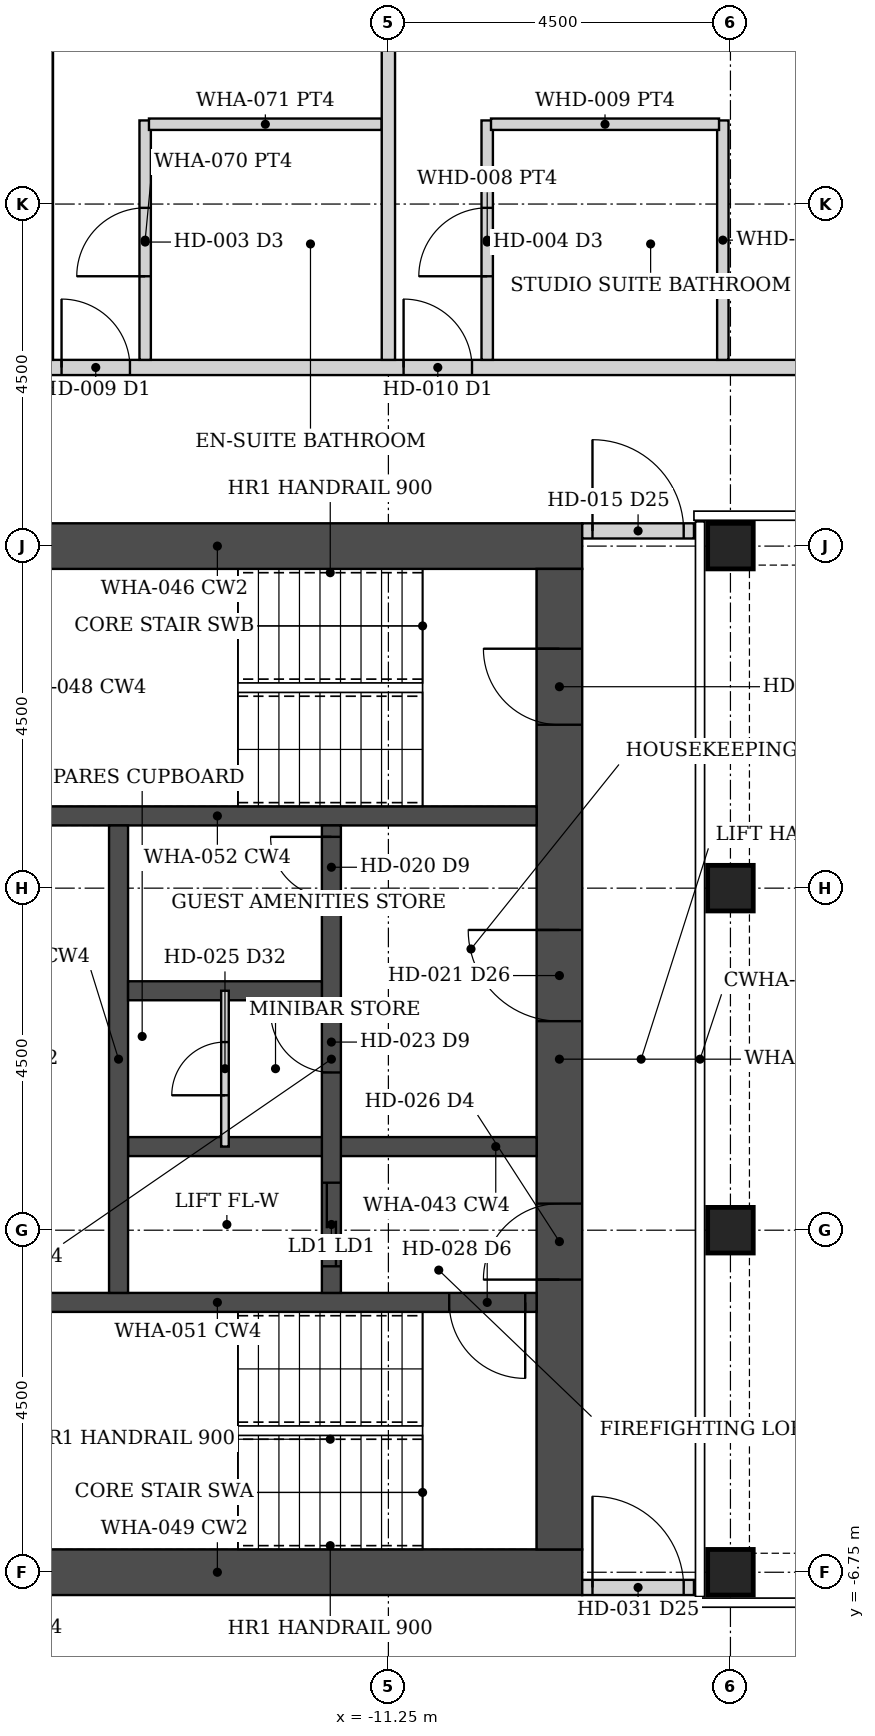
"""IFC4 building model, lengths in metres.
Left out: names, types, materials, properties, quantities, classifications, styles, units other than length and angle.
Written with IfcOpenShell. Run it as: python <this file> out.ifc"""

import sys

from ifc_helpers import new_model, si_unit, direction, frame, frame_2d, origin, origin_2d, place, context, subcontext, project, spatial, rectangle, hollow_rectangle, extrude, element, fill, save


model = new_model("IFC4")
c1 = context("Model", 3, precision=1e-05, world=origin(), true_north=direction((0.0, 1.0)))
c2 = subcontext(c1, "Body", "Model", "MODEL_VIEW")
j1 = project(units=[si_unit("LENGTHUNIT", "METRE"), si_unit("PLANEANGLEUNIT", "RADIAN")], contexts=[c1])
p1 = place(None, origin())
s1 = spatial("IfcSite", under=j1, at=p1, CompositionType="ELEMENT")
p2 = place(p1, origin())
s2 = spatial("IfcBuilding", under=s1, at=p2, CompositionType="ELEMENT")
p3 = place(p2, frame((0.0, 0.0, 150.8)))
s3 = spatial("IfcBuildingStorey", under=s2, at=p3, CompositionType="ELEMENT", Elevation=150.8)
for number, where, z_axis, x_axis in (
    (1, (-6.75, -6.75, 0.0), (0.0, 0.0, 1.0), (1.0, 0.0, 0.0)),
    (2, (-6.75, -2.25, 0.0), (0.0, 0.0, 1.0), (1.0, 0.0, 0.0)),
    (3, (-6.75, 2.25, 0.0), (0.0, 0.0, 1.0), (1.0, 0.0, 0.0)),
    (4, (-6.75, 6.75, 0.0), (0.0, 0.0, 1.0), (1.0, 0.0, 0.0)),
):
    element("IfcColumn", number, at=place(p3, frame(where, z_axis=z_axis, x_axis=x_axis)), inside=s3, PredefinedType="COLUMN", context=c2, shape_type="SweptSolid", body=[
        extrude(hollow_rectangle(XDim=0.6, YDim=0.6, WallThickness=0.04, at=origin_2d()), origin(), (0.0, 0.0, 1.0), 3.6),
    ])
for number, where, z_axis, x_axis in (
    (5, (-8.7, -6.75, 0.0), (0.0, 0.0, 1.0), (-1.0, 0.0, 0.0)),
    (6, (-8.7, 6.75, 0.0), (0.0, 0.0, 1.0), (-1.0, 0.0, 0.0)),
):
    element("IfcWall", number, at=place(p3, frame(where, z_axis=z_axis, x_axis=x_axis)), inside=s3, PredefinedType="SHEAR", context=c2, shape_type="SweptSolid", body=[
        extrude(rectangle(XDim=9.6, YDim=0.6, at=frame_2d((4.8, 0.0))), origin(), (0.0, 0.0, 1.0), 3.6),
    ])
p4 = place(p3, frame((-9.0, -6.45, 0.0), z_axis=(0.0, 0.0, 1.0), x_axis=(0.0, 1.0, 0.0)))
e7 = element("IfcWall", 7, at=p4, inside=s3, PredefinedType="SHEAR", context=c2, shape_type="SweptSolid", body=[
    extrude(rectangle(XDim=12.9, YDim=0.6, at=frame_2d((6.45, 0.0))), origin(), (0.0, 0.0, 1.0), 3.6),
])
p5 = place(p4, frame((3.55, 0.0, 0.0)))
e8 = element("IfcOpeningElement", 8, at=p5, cuts=e7, PredefinedType="OPENING", context=c2, shape_type="SweptSolid", body=[
    extrude(rectangle(XDim=1.0, YDim=2.1, at=frame_2d((0.5, 1.05))), frame((0.0, 0.31, 0.0), z_axis=(0.0, -1.0, 0.0), x_axis=(1.0, 0.0, 0.0)), (0.0, 0.0, 1.0), 0.62),
])
p6 = place(p4, frame((6.95, 0.0, 0.0)))
e9 = element("IfcOpeningElement", 9, at=p6, cuts=e7, PredefinedType="OPENING", context=c2, shape_type="SweptSolid", body=[
    extrude(rectangle(XDim=1.2, YDim=2.1, at=frame_2d((0.6, 1.05))), frame((0.0, 0.31, 0.0), z_axis=(0.0, -1.0, 0.0), x_axis=(1.0, 0.0, 0.0)), (0.0, 0.0, 1.0), 0.62),
])
p7 = place(p4, frame((10.85, 0.0, 0.0)))
e10 = element("IfcOpeningElement", 10, at=p7, cuts=e7, PredefinedType="OPENING", context=c2, shape_type="SweptSolid", body=[
    extrude(rectangle(XDim=1.0, YDim=2.1, at=frame_2d((0.5, 1.05))), frame((0.0, 0.31, 0.0), z_axis=(0.0, -1.0, 0.0), x_axis=(1.0, 0.0, 0.0)), (0.0, 0.0, 1.0), 0.62),
])
p8 = place(p3, frame((-9.3, -3.2, 0.0), z_axis=(0.0, 0.0, 1.0), x_axis=(-1.0, 0.0, 0.0)))
e11 = element("IfcWall", 11, at=p8, inside=s3, PredefinedType="SHEAR", context=c2, shape_type="SweptSolid", body=[
    extrude(rectangle(XDim=8.4, YDim=0.25, at=frame_2d((4.2, 0.0))), origin(), (0.0, 0.0, 1.0), 3.6),
])
p9 = place(p8, frame((0.15, 0.0, 0.0)))
e12 = element("IfcOpeningElement", 12, at=p9, cuts=e11, PredefinedType="OPENING", context=c2, shape_type="SweptSolid", body=[
    extrude(rectangle(XDim=1.0, YDim=2.1, at=frame_2d((0.5, 1.05))), frame((0.0, 0.135, 0.0), z_axis=(0.0, -1.0, 0.0), x_axis=(1.0, 0.0, 0.0)), (0.0, 0.0, 1.0), 0.27),
])
p10 = place(p3, frame((-9.3, 3.2, 0.0), z_axis=(0.0, 0.0, 1.0), x_axis=(-1.0, 0.0, 0.0)))
e13 = element("IfcWall", 13, at=p10, inside=s3, PredefinedType="SHEAR", context=c2, shape_type="SweptSolid", body=[
    extrude(rectangle(XDim=8.4, YDim=0.25, at=frame_2d((4.2, 0.0))), origin(), (0.0, 0.0, 1.0), 3.6),
])
p11 = place(p3, frame((-9.3, -1.15, 0.0), z_axis=(0.0, 0.0, 1.0), x_axis=(-1.0, 0.0, 0.0)))
e14 = element("IfcWall", 14, at=p11, inside=s3, PredefinedType="SHEAR", context=c2, shape_type="SweptSolid", body=[
    extrude(rectangle(XDim=5.375, YDim=0.25, at=frame_2d((2.688, 0.0))), origin(), (0.0, 0.0, 1.0), 3.6),
])
p12 = place(p3, frame((-12.0, -3.075, 0.0), z_axis=(0.0, 0.0, 1.0), x_axis=(0.0, 1.0, 0.0)))
e15 = element("IfcWall", 15, at=p12, inside=s3, PredefinedType="SHEAR", context=c2, shape_type="SweptSolid", body=[
    extrude(rectangle(XDim=6.15, YDim=0.25, at=frame_2d((3.075, 0.0))), origin(), (0.0, 0.0, 1.0), 3.6),
])
p13 = place(p12, frame((2.9, 0.0, 0.0)))
e16 = element("IfcOpeningElement", 16, at=p13, cuts=e15, PredefinedType="OPENING", context=c2, shape_type="SweptSolid", body=[
    extrude(rectangle(XDim=0.8, YDim=2.1, at=frame_2d((0.4, 1.05))), frame((0.0, 0.135, 0.0), z_axis=(0.0, -1.0, 0.0), x_axis=(1.0, 0.0, 0.0)), (0.0, 0.0, 1.0), 0.27),
])
p14 = place(p12, frame((5.2, 0.0, 0.0)))
e17 = element("IfcOpeningElement", 17, at=p14, cuts=e15, PredefinedType="OPENING", context=c2, shape_type="SweptSolid", body=[
    extrude(rectangle(XDim=0.8, YDim=2.1, at=frame_2d((0.4, 1.05))), frame((0.0, 0.135, 0.0), z_axis=(0.0, -1.0, 0.0), x_axis=(1.0, 0.0, 0.0)), (0.0, 0.0, 1.0), 0.27),
])
p15 = place(p12, frame((0.35, 0.0, 0.0)))
e18 = element("IfcOpeningElement", 18, at=p15, cuts=e15, PredefinedType="OPENING", context=c2, shape_type="SweptSolid", body=[
    extrude(rectangle(XDim=1.1, YDim=2.1, at=frame_2d((0.55, 1.05))), frame((0.0, 0.135, 0.0), z_axis=(0.0, -1.0, 0.0), x_axis=(1.0, 0.0, 0.0)), (0.0, 0.0, 1.0), 0.27),
])
p16 = place(p3, frame((-14.8, -3.075, 0.0), z_axis=(0.0, 0.0, 1.0), x_axis=(0.0, 1.0, 0.0)))
e19 = element("IfcWall", 19, at=p16, inside=s3, PredefinedType="SHEAR", context=c2, shape_type="SweptSolid", body=[
    extrude(rectangle(XDim=6.15, YDim=0.25, at=frame_2d((3.075, 0.0))), origin(), (0.0, 0.0, 1.0), 3.6),
])
p17 = place(p3, frame((-12.125, 0.9, 0.0), z_axis=(0.0, 0.0, 1.0), x_axis=(-1.0, 0.0, 0.0)))
e20 = element("IfcWall", 20, at=p17, inside=s3, PredefinedType="SHEAR", context=c2, shape_type="SweptSolid", body=[
    extrude(rectangle(XDim=2.55, YDim=0.25, at=frame_2d((1.275, 0.0))), origin(), (0.0, 0.0, 1.0), 3.6),
])
p18 = place(p3, frame((-8.7, 6.95, 0.0), z_axis=(0.0, 0.0, 1.0), x_axis=(1.0, 0.0, 0.0)))
e21 = element("IfcWall", 21, at=p18, inside=s3, PredefinedType="PARTITIONING", context=c2, shape_type="SweptSolid", body=[
    extrude(rectangle(XDim=1.47, YDim=0.2, at=frame_2d((0.735, 0.0))), origin(), (0.0, 0.0, 1.0), 2.473),
])
p19 = place(p18, frame((0.135, 0.0, 0.0)))
e22 = element("IfcOpeningElement", 22, at=p19, cuts=e21, PredefinedType="OPENING", context=c2, shape_type="SweptSolid", body=[
    extrude(rectangle(XDim=1.2, YDim=2.1, at=frame_2d((0.6, 1.05))), frame((0.0, 0.11, 0.0), z_axis=(0.0, -1.0, 0.0), x_axis=(1.0, 0.0, 0.0)), (0.0, 0.0, 1.0), 0.22),
])
p20 = place(p3, frame((-8.7, -6.95, 0.0), z_axis=(0.0, 0.0, 1.0), x_axis=(1.0, 0.0, 0.0)))
e23 = element("IfcWall", 23, at=p20, inside=s3, PredefinedType="PARTITIONING", context=c2, shape_type="SweptSolid", body=[
    extrude(rectangle(XDim=1.47, YDim=0.2, at=frame_2d((0.735, 0.0))), origin(), (0.0, 0.0, 1.0), 2.473),
])
p21 = place(p20, frame((0.135, 0.0, 0.0)))
e24 = element("IfcOpeningElement", 24, at=p21, cuts=e23, PredefinedType="OPENING", context=c2, shape_type="SweptSolid", body=[
    extrude(rectangle(XDim=1.2, YDim=2.1, at=frame_2d((0.6, 1.05))), frame((0.0, 0.11, 0.0), z_axis=(0.0, -1.0, 0.0), x_axis=(1.0, 0.0, 0.0)), (0.0, 0.0, 1.0), 0.22),
])
p22 = place(p3, frame((-22.3, 9.1, 0.0), z_axis=(0.0, 0.0, 1.0), x_axis=(1.0, 0.0, 0.0)))
e25 = element("IfcWall", 25, at=p22, inside=s3, PredefinedType="PARTITIONING", context=c2, shape_type="SweptSolid", body=[
    extrude(rectangle(XDim=44.6, YDim=0.2, at=frame_2d((22.3, 0.0))), origin(), (0.0, 0.0, 1.0), 2.473),
])
p23 = place(p22, frame((6.75, 0.0, 0.0)))
e26 = element("IfcOpeningElement", 26, at=p23, cuts=e25, PredefinedType="OPENING", context=c2, shape_type="SweptSolid", body=[
    extrude(rectangle(XDim=0.9, YDim=2.1, at=frame_2d((0.45, 1.05))), frame((0.0, 0.11, 0.0), z_axis=(0.0, -1.0, 0.0), x_axis=(1.0, 0.0, 0.0)), (0.0, 0.0, 1.0), 0.22),
])
p24 = place(p22, frame((11.25, 0.0, 0.0)))
e27 = element("IfcOpeningElement", 27, at=p24, cuts=e25, PredefinedType="OPENING", context=c2, shape_type="SweptSolid", body=[
    extrude(rectangle(XDim=0.9, YDim=2.1, at=frame_2d((0.45, 1.05))), frame((0.0, 0.11, 0.0), z_axis=(0.0, -1.0, 0.0), x_axis=(1.0, 0.0, 0.0)), (0.0, 0.0, 1.0), 0.22),
])
p25 = place(p22, frame((23.45, 0.0, 0.0)))
e28 = element("IfcOpeningElement", 28, at=p25, cuts=e25, PredefinedType="OPENING", context=c2, shape_type="SweptSolid", body=[
    extrude(rectangle(XDim=0.9, YDim=2.1, at=frame_2d((0.45, 1.05))), frame((0.0, 0.11, 0.0), z_axis=(0.0, -1.0, 0.0), x_axis=(1.0, 0.0, 0.0)), (0.0, 0.0, 1.0), 0.22),
])
p26 = place(p22, frame((32.45, 0.0, 0.0)))
e29 = element("IfcOpeningElement", 29, at=p26, cuts=e25, PredefinedType="OPENING", context=c2, shape_type="SweptSolid", body=[
    extrude(rectangle(XDim=0.9, YDim=2.1, at=frame_2d((0.45, 1.05))), frame((0.0, 0.11, 0.0), z_axis=(0.0, -1.0, 0.0), x_axis=(1.0, 0.0, 0.0)), (0.0, 0.0, 1.0), 0.22),
])
p27 = place(p22, frame((33.75, 0.0, 0.0)))
e30 = element("IfcOpeningElement", 30, at=p27, cuts=e25, PredefinedType="OPENING", context=c2, shape_type="SweptSolid", body=[
    extrude(rectangle(XDim=0.9, YDim=2.1, at=frame_2d((0.45, 1.05))), frame((0.0, 0.11, 0.0), z_axis=(0.0, -1.0, 0.0), x_axis=(1.0, 0.0, 0.0)), (0.0, 0.0, 1.0), 0.22),
])
p28 = place(p22, frame((38.85, 0.0, 0.0)))
e31 = element("IfcOpeningElement", 31, at=p28, cuts=e25, PredefinedType="OPENING", context=c2, shape_type="SweptSolid", body=[
    extrude(rectangle(XDim=0.9, YDim=2.1, at=frame_2d((0.45, 1.05))), frame((0.0, 0.11, 0.0), z_axis=(0.0, -1.0, 0.0), x_axis=(1.0, 0.0, 0.0)), (0.0, 0.0, 1.0), 0.22),
])
p29 = place(p22, frame((4.85, 0.0, 0.0)))
e32 = element("IfcOpeningElement", 32, at=p29, cuts=e25, PredefinedType="OPENING", context=c2, shape_type="SweptSolid", body=[
    extrude(rectangle(XDim=0.9, YDim=2.1, at=frame_2d((0.45, 1.05))), frame((0.0, 0.11, 0.0), z_axis=(0.0, -1.0, 0.0), x_axis=(1.0, 0.0, 0.0)), (0.0, 0.0, 1.0), 0.22),
])
p30 = place(p3, frame((-14.45, 9.2, 0.0), z_axis=(0.0, 0.0, 1.0), x_axis=(0.0, 1.0, 0.0)))
e33 = element("IfcWall", 33, at=p30, inside=s3, PredefinedType="PARTITIONING", context=c2, shape_type="SweptSolid", body=[
    extrude(rectangle(XDim=3.15, YDim=0.15, at=frame_2d((1.575, 0.0))), origin(), (0.0, 0.0, 1.0), 2.473),
])
p31 = place(p30, frame((1.1, 0.0, 0.0)))
e34 = element("IfcOpeningElement", 34, at=p31, cuts=e33, PredefinedType="OPENING", context=c2, shape_type="SweptSolid", body=[
    extrude(rectangle(XDim=0.9, YDim=2.1, at=frame_2d((0.45, 1.05))), frame((0.0, 0.085, 0.0), z_axis=(0.0, -1.0, 0.0), x_axis=(1.0, 0.0, 0.0)), (0.0, 0.0, 1.0), 0.17),
])
p32 = place(p3, frame((-14.4, 12.3, 0.0), z_axis=(0.0, 0.0, 1.0), x_axis=(1.0, 0.0, 0.0)))
e35 = element("IfcWall", 35, at=p32, inside=s3, PredefinedType="PARTITIONING", context=c2, shape_type="SweptSolid", body=[
    extrude(rectangle(XDim=3.062, YDim=0.15, at=frame_2d((1.531, 0.0))), origin(), (0.0, 0.0, 1.0), 2.473),
])
p33 = place(p3, frame((-9.95, 9.2, 0.0), z_axis=(0.0, 0.0, 1.0), x_axis=(0.0, 1.0, 0.0)))
e36 = element("IfcWall", 36, at=p33, inside=s3, PredefinedType="PARTITIONING", context=c2, shape_type="SweptSolid", body=[
    extrude(rectangle(XDim=3.15, YDim=0.15, at=frame_2d((1.575, 0.0))), origin(), (0.0, 0.0, 1.0), 2.473),
])
p34 = place(p33, frame((1.1, 0.0, 0.0)))
e37 = element("IfcOpeningElement", 37, at=p34, cuts=e36, PredefinedType="OPENING", context=c2, shape_type="SweptSolid", body=[
    extrude(rectangle(XDim=0.9, YDim=2.1, at=frame_2d((0.45, 1.05))), frame((0.0, 0.085, 0.0), z_axis=(0.0, -1.0, 0.0), x_axis=(1.0, 0.0, 0.0)), (0.0, 0.0, 1.0), 0.17),
])
p35 = place(p3, frame((-6.85, 9.2, 0.0), z_axis=(0.0, 0.0, 1.0), x_axis=(0.0, 1.0, 0.0)))
e38 = element("IfcWall", 38, at=p35, inside=s3, PredefinedType="PARTITIONING", context=c2, shape_type="SweptSolid", body=[
    extrude(rectangle(XDim=3.15, YDim=0.15, at=frame_2d((1.575, 0.0))), origin(), (0.0, 0.0, 1.0), 2.473),
])
p36 = place(p3, frame((-9.9, 12.3, 0.0), z_axis=(0.0, 0.0, 1.0), x_axis=(1.0, 0.0, 0.0)))
e39 = element("IfcWall", 39, at=p36, inside=s3, PredefinedType="PARTITIONING", context=c2, shape_type="SweptSolid", body=[
    extrude(rectangle(XDim=3.0, YDim=0.15, at=frame_2d((1.5, 0.0))), origin(), (0.0, 0.0, 1.0), 2.473),
])
for number, where, z_axis, x_axis in (
    (40, (-15.75, 9.2, 0.0), (0.0, 0.0, 1.0), (0.0, 1.0, 0.0)),
    (41, (-11.25, 9.2, 0.0), (0.0, 0.0, 1.0), (0.0, 1.0, 0.0)),
):
    element("IfcWall", number, at=place(p3, frame(where, z_axis=z_axis, x_axis=x_axis)), inside=s3, PredefinedType="PARTITIONING", context=c2, shape_type="SweptSolid", body=[
        extrude(rectangle(XDim=12.9, YDim=0.175, at=frame_2d((6.45, 0.0))), origin(), (0.0, 0.0, 1.0), 2.473),
    ])
p37 = place(p3, frame((-13.4, -1.15, 0.0), z_axis=(0.0, 0.0, 1.0), x_axis=(0.0, 1.0, 0.0)))
e42 = element("IfcWall", 42, at=p37, inside=s3, PredefinedType="PARTITIONING", context=c2, shape_type="SweptSolid", body=[
    extrude(rectangle(XDim=2.05, YDim=0.1, at=frame_2d((1.025, 0.0))), origin(), (0.0, 0.0, 1.0), 2.473),
])
p38 = place(p37, frame((0.675, 0.0, 0.0)))
e43 = element("IfcOpeningElement", 43, at=p38, cuts=e42, PredefinedType="OPENING", context=c2, shape_type="SweptSolid", body=[
    extrude(rectangle(XDim=0.7, YDim=2.1, at=frame_2d((0.35, 1.05))), frame((0.0, 0.06, 0.0), z_axis=(0.0, -1.0, 0.0), x_axis=(1.0, 0.0, 0.0)), (0.0, 0.0, 1.0), 0.12),
])
p39 = place(p19, origin())
e44 = element("IfcDoor", 44, at=p39, inside=s3, OperationType="DOUBLE_DOOR_DOUBLE_SWING", PredefinedType="DOOR", context=c2, shape_type="SweptSolid", body=[
    extrude(rectangle(XDim=1.2, YDim=2.1, at=frame_2d((0.6, 1.05))), frame((0.0, 0.025, 0.0), z_axis=(0.0, -1.0, 0.0), x_axis=(1.0, 0.0, 0.0)), (0.0, 0.0, 1.0), 0.05),
])
fill(e22, e44)
p40 = place(p21, origin())
e45 = element("IfcDoor", 45, at=p40, inside=s3, OperationType="DOUBLE_DOOR_DOUBLE_SWING", PredefinedType="DOOR", context=c2, shape_type="SweptSolid", body=[
    extrude(rectangle(XDim=1.2, YDim=2.1, at=frame_2d((0.6, 1.05))), frame((0.0, 0.025, 0.0), z_axis=(0.0, -1.0, 0.0), x_axis=(1.0, 0.0, 0.0)), (0.0, 0.0, 1.0), 0.05),
])
fill(e24, e45)
p41 = place(p23, origin())
e46 = element("IfcDoor", 46, at=p41, inside=s3, OperationType="SINGLE_SWING_LEFT", PredefinedType="DOOR", context=c2, shape_type="SweptSolid", body=[
    extrude(rectangle(XDim=0.9, YDim=2.1, at=frame_2d((0.45, 1.05))), frame((0.0, 0.025, 0.0), z_axis=(0.0, -1.0, 0.0), x_axis=(1.0, 0.0, 0.0)), (0.0, 0.0, 1.0), 0.05),
])
fill(e26, e46)
p42 = place(p31, origin())
e47 = element("IfcDoor", 47, at=p42, inside=s3, OperationType="SINGLE_SWING_LEFT", PredefinedType="DOOR", context=c2, shape_type="SweptSolid", body=[
    extrude(rectangle(XDim=0.9, YDim=2.1, at=frame_2d((0.45, 1.05))), frame((0.0, 0.025, 0.0), z_axis=(0.0, -1.0, 0.0), x_axis=(1.0, 0.0, 0.0)), (0.0, 0.0, 1.0), 0.05),
])
fill(e34, e47)
p43 = place(p24, origin())
e48 = element("IfcDoor", 48, at=p43, inside=s3, OperationType="SINGLE_SWING_LEFT", PredefinedType="DOOR", context=c2, shape_type="SweptSolid", body=[
    extrude(rectangle(XDim=0.9, YDim=2.1, at=frame_2d((0.45, 1.05))), frame((0.0, 0.025, 0.0), z_axis=(0.0, -1.0, 0.0), x_axis=(1.0, 0.0, 0.0)), (0.0, 0.0, 1.0), 0.05),
])
fill(e27, e48)
p44 = place(p34, origin())
e49 = element("IfcDoor", 49, at=p44, inside=s3, OperationType="SINGLE_SWING_LEFT", PredefinedType="DOOR", context=c2, shape_type="SweptSolid", body=[
    extrude(rectangle(XDim=0.9, YDim=2.1, at=frame_2d((0.45, 1.05))), frame((0.0, 0.025, 0.0), z_axis=(0.0, -1.0, 0.0), x_axis=(1.0, 0.0, 0.0)), (0.0, 0.0, 1.0), 0.05),
])
fill(e37, e49)
p45 = place(p5, origin())
e50 = element("IfcDoor", 50, at=p45, inside=s3, OperationType="SINGLE_SWING_LEFT", PredefinedType="DOOR", context=c2, shape_type="SweptSolid", body=[
    extrude(rectangle(XDim=1.0, YDim=2.1, at=frame_2d((0.5, 1.05))), frame((0.0, 0.025, 0.0), z_axis=(0.0, -1.0, 0.0), x_axis=(1.0, 0.0, 0.0)), (0.0, 0.0, 1.0), 0.05),
])
fill(e8, e50)
p46 = place(p9, origin())
e51 = element("IfcDoor", 51, at=p46, inside=s3, OperationType="SINGLE_SWING_LEFT", PredefinedType="DOOR", context=c2, shape_type="SweptSolid", body=[
    extrude(rectangle(XDim=1.0, YDim=2.1, at=frame_2d((0.5, 1.05))), frame((0.0, 0.025, 0.0), z_axis=(0.0, -1.0, 0.0), x_axis=(1.0, 0.0, 0.0)), (0.0, 0.0, 1.0), 0.05),
])
fill(e12, e51)
p47 = place(p6, origin())
e52 = element("IfcDoor", 52, at=p47, inside=s3, OperationType="SINGLE_SWING_RIGHT", PredefinedType="DOOR", context=c2, shape_type="SweptSolid", body=[
    extrude(rectangle(XDim=1.2, YDim=2.1, at=frame_2d((0.6, 1.05))), frame((0.0, 0.025, 0.0), z_axis=(0.0, -1.0, 0.0), x_axis=(1.0, 0.0, 0.0)), (0.0, 0.0, 1.0), 0.05),
])
fill(e9, e52)
p48 = place(p38, origin())
e53 = element("IfcDoor", 53, at=p48, inside=s3, OperationType="SINGLE_SWING_LEFT", PredefinedType="DOOR", context=c2, shape_type="SweptSolid", body=[
    extrude(rectangle(XDim=0.7, YDim=2.1, at=frame_2d((0.35, 1.05))), frame((0.0, 0.025, 0.0), z_axis=(0.0, -1.0, 0.0), x_axis=(1.0, 0.0, 0.0)), (0.0, 0.0, 1.0), 0.05),
])
fill(e43, e53)
p49 = place(p13, origin())
e54 = element("IfcDoor", 54, at=p49, inside=s3, OperationType="SINGLE_SWING_RIGHT", PredefinedType="DOOR", context=c2, shape_type="SweptSolid", body=[
    extrude(rectangle(XDim=0.8, YDim=2.1, at=frame_2d((0.4, 1.05))), frame((0.0, 0.025, 0.0), z_axis=(0.0, -1.0, 0.0), x_axis=(1.0, 0.0, 0.0)), (0.0, 0.0, 1.0), 0.05),
])
fill(e16, e54)
p50 = place(p14, origin())
e55 = element("IfcDoor", 55, at=p50, inside=s3, OperationType="SINGLE_SWING_RIGHT", PredefinedType="DOOR", context=c2, shape_type="SweptSolid", body=[
    extrude(rectangle(XDim=0.8, YDim=2.1, at=frame_2d((0.4, 1.05))), frame((0.0, 0.025, 0.0), z_axis=(0.0, -1.0, 0.0), x_axis=(1.0, 0.0, 0.0)), (0.0, 0.0, 1.0), 0.05),
])
fill(e17, e55)
p51 = place(p7, origin())
e56 = element("IfcDoor", 56, at=p51, inside=s3, OperationType="SINGLE_SWING_RIGHT", PredefinedType="DOOR", context=c2, shape_type="SweptSolid", body=[
    extrude(rectangle(XDim=1.0, YDim=2.1, at=frame_2d((0.5, 1.05))), frame((0.0, 0.025, 0.0), z_axis=(0.0, -1.0, 0.0), x_axis=(1.0, 0.0, 0.0)), (0.0, 0.0, 1.0), 0.05),
])
fill(e10, e56)
p52 = place(p15, origin())
e57 = element("IfcDoor", 57, at=p52, inside=s3, OperationType="DOUBLE_DOOR_SLIDING", PredefinedType="DOOR", context=c2, shape_type="SweptSolid", body=[
    extrude(rectangle(XDim=1.1, YDim=2.1, at=frame_2d((0.55, 1.05))), frame((0.0, 0.025, 0.0), z_axis=(0.0, -1.0, 0.0), x_axis=(1.0, 0.0, 0.0)), (0.0, 0.0, 1.0), 0.05),
])
fill(e18, e57)
save(model, sys.argv[1])
